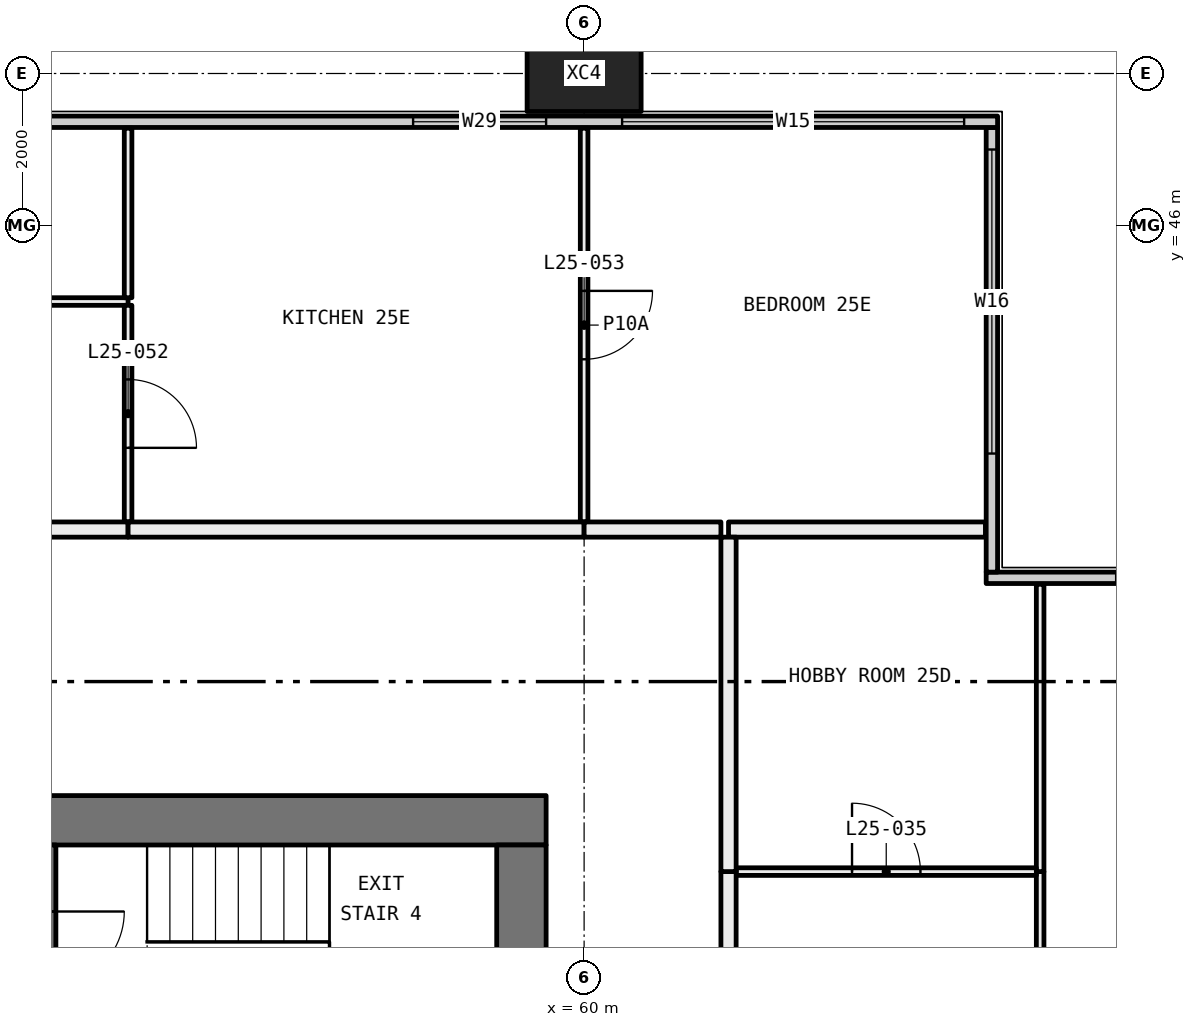
"""IFC4 building model, lengths in metres.
Left out: names, types, materials, properties, quantities, classifications, styles, units other than length and angle.
Written with IfcOpenShell. Run it as: python <this file> out.ifc"""

import sys

from ifc_helpers import new_model, si_unit, direction, frame, frame_2d, origin, origin_2d, place, context, subcontext, project, spatial, rectangle, hollow_rectangle, extrude, element, fill, save


model = new_model("IFC4")
c1 = context("Model", 3, precision=1e-05, world=origin(), true_north=direction((0.0, 1.0)))
c2 = subcontext(c1, "Body", "Model", "MODEL_VIEW")
j1 = project(units=[si_unit("LENGTHUNIT", "METRE"), si_unit("PLANEANGLEUNIT", "RADIAN")], contexts=[c1])
p1 = place(None, origin())
s1 = spatial("IfcSite", under=j1, at=p1, CompositionType="ELEMENT")
p2 = place(p1, origin())
s2 = spatial("IfcBuilding", under=s1, at=p2, CompositionType="ELEMENT")
p3 = place(p2, frame((0.0, 0.0, 100.05)))
s3 = spatial("IfcBuildingStorey", under=s2, at=p3, CompositionType="ELEMENT", Elevation=100.05)
p4 = place(p3, frame((60.0, 48.0, -0.4), z_axis=(0.0, 0.0, 1.0), x_axis=(1.0, 0.0, 0.0)))
e1 = element("IfcColumn", 1, at=p4, inside=s3, PredefinedType="COLUMN", context=c2, shape_type="SweptSolid", body=[
    extrude(hollow_rectangle(XDim=1.5, YDim=1.0, WallThickness=0.06, at=origin_2d()), origin(), (0.0, 0.0, 1.0), 3.45),
])
p5 = place(p3, frame((65.29, 41.365, 0.0), z_axis=(0.0, 0.0, 1.0), x_axis=(1.0, 0.0, 0.0)))
e2 = element("IfcWall", 2, at=p5, inside=s3, PredefinedType="ELEMENTEDWALL", context=c2, shape_type="SweptSolid", body=[
    extrude(rectangle(XDim=6.15, YDim=0.15, at=frame_2d((3.075, 0.0))), origin(), (0.0, 0.0, 1.0), 3.05),
])
p6 = place(p5, frame((1.71, 0.0, 0.45)))
e3 = element("IfcOpeningElement", 3, at=p6, cuts=e2, PredefinedType="OPENING", context=c2, shape_type="SweptSolid", body=[
    extrude(rectangle(XDim=4.0, YDim=2.55, at=frame_2d((2.0, 1.275))), frame((0.0, 0.085, 0.0), z_axis=(0.0, -1.0, 0.0), x_axis=(1.0, 0.0, 0.0)), (0.0, 0.0, 1.0), 0.17),
])
p7 = place(p3, frame((65.365, 41.44, 0.0), z_axis=(0.0, 0.0, 1.0), x_axis=(0.0, 1.0, 0.0)))
e4 = element("IfcWall", 4, at=p7, inside=s3, PredefinedType="ELEMENTEDWALL", context=c2, shape_type="SweptSolid", body=[
    extrude(rectangle(XDim=5.85, YDim=0.15, at=frame_2d((2.925, 0.0))), origin(), (0.0, 0.0, 1.0), 3.05),
])
p8 = place(p7, frame((1.56, 0.0, 0.45)))
e5 = element("IfcOpeningElement", 5, at=p8, cuts=e4, PredefinedType="OPENING", context=c2, shape_type="SweptSolid", body=[
    extrude(rectangle(XDim=4.0, YDim=2.55, at=frame_2d((2.0, 1.275))), frame((0.0, 0.085, 0.0), z_axis=(0.0, -1.0, 0.0), x_axis=(1.0, 0.0, 0.0)), (0.0, 0.0, 1.0), 0.17),
])
p9 = place(p3, frame((6.56, 47.365, 0.0), z_axis=(0.0, 0.0, 1.0), x_axis=(1.0, 0.0, 0.0)))
e6 = element("IfcWall", 6, at=p9, inside=s3, PredefinedType="ELEMENTEDWALL", context=c2, shape_type="SweptSolid", body=[
    extrude(rectangle(XDim=58.88, YDim=0.15, at=frame_2d((29.44, 0.0))), origin(), (0.0, 0.0, 1.0), 3.05),
])
p10 = place(p9, frame((0.44, 0.0, 0.45)))
e7 = element("IfcOpeningElement", 7, at=p10, cuts=e6, PredefinedType="OPENING", context=c2, shape_type="SweptSolid", body=[
    extrude(rectangle(XDim=4.5, YDim=2.55, at=frame_2d((2.25, 1.275))), frame((0.0, 0.085, 0.0), z_axis=(0.0, -1.0, 0.0), x_axis=(1.0, 0.0, 0.0)), (0.0, 0.0, 1.0), 0.17),
])
p11 = place(p9, frame((5.94, 0.0, 0.45)))
e8 = element("IfcOpeningElement", 8, at=p11, cuts=e6, PredefinedType="OPENING", context=c2, shape_type="SweptSolid", body=[
    extrude(rectangle(XDim=1.75, YDim=2.55, at=frame_2d((0.875, 1.275))), frame((0.0, 0.085, 0.0), z_axis=(0.0, -1.0, 0.0), x_axis=(1.0, 0.0, 0.0)), (0.0, 0.0, 1.0), 0.17),
])
p12 = place(p9, frame((15.19, 0.0, 0.45)))
e9 = element("IfcOpeningElement", 9, at=p12, cuts=e6, PredefinedType="OPENING", context=c2, shape_type="SweptSolid", body=[
    extrude(rectangle(XDim=1.75, YDim=2.55, at=frame_2d((0.875, 1.275))), frame((0.0, 0.085, 0.0), z_axis=(0.0, -1.0, 0.0), x_axis=(1.0, 0.0, 0.0)), (0.0, 0.0, 1.0), 0.17),
])
p13 = place(p9, frame((17.94, 0.0, 0.45)))
e10 = element("IfcOpeningElement", 10, at=p13, cuts=e6, PredefinedType="OPENING", context=c2, shape_type="SweptSolid", body=[
    extrude(rectangle(XDim=1.75, YDim=2.55, at=frame_2d((0.875, 1.275))), frame((0.0, 0.085, 0.0), z_axis=(0.0, -1.0, 0.0), x_axis=(1.0, 0.0, 0.0)), (0.0, 0.0, 1.0), 0.17),
])
p14 = place(p9, frame((27.19, 0.0, 0.45)))
e11 = element("IfcOpeningElement", 11, at=p14, cuts=e6, PredefinedType="OPENING", context=c2, shape_type="SweptSolid", body=[
    extrude(rectangle(XDim=1.75, YDim=2.55, at=frame_2d((0.875, 1.275))), frame((0.0, 0.085, 0.0), z_axis=(0.0, -1.0, 0.0), x_axis=(1.0, 0.0, 0.0)), (0.0, 0.0, 1.0), 0.17),
])
p15 = place(p9, frame((29.94, 0.0, 0.45)))
e12 = element("IfcOpeningElement", 12, at=p15, cuts=e6, PredefinedType="OPENING", context=c2, shape_type="SweptSolid", body=[
    extrude(rectangle(XDim=1.75, YDim=2.55, at=frame_2d((0.875, 1.275))), frame((0.0, 0.085, 0.0), z_axis=(0.0, -1.0, 0.0), x_axis=(1.0, 0.0, 0.0)), (0.0, 0.0, 1.0), 0.17),
])
p16 = place(p9, frame((39.19, 0.0, 0.45)))
e13 = element("IfcOpeningElement", 13, at=p16, cuts=e6, PredefinedType="OPENING", context=c2, shape_type="SweptSolid", body=[
    extrude(rectangle(XDim=1.75, YDim=2.55, at=frame_2d((0.875, 1.275))), frame((0.0, 0.085, 0.0), z_axis=(0.0, -1.0, 0.0), x_axis=(1.0, 0.0, 0.0)), (0.0, 0.0, 1.0), 0.17),
])
p17 = place(p9, frame((41.94, 0.0, 0.45)))
e14 = element("IfcOpeningElement", 14, at=p17, cuts=e6, PredefinedType="OPENING", context=c2, shape_type="SweptSolid", body=[
    extrude(rectangle(XDim=1.75, YDim=2.55, at=frame_2d((0.875, 1.275))), frame((0.0, 0.085, 0.0), z_axis=(0.0, -1.0, 0.0), x_axis=(1.0, 0.0, 0.0)), (0.0, 0.0, 1.0), 0.17),
])
p18 = place(p9, frame((51.19, 0.0, 0.45)))
e15 = element("IfcOpeningElement", 15, at=p18, cuts=e6, PredefinedType="OPENING", context=c2, shape_type="SweptSolid", body=[
    extrude(rectangle(XDim=1.75, YDim=2.55, at=frame_2d((0.875, 1.275))), frame((0.0, 0.085, 0.0), z_axis=(0.0, -1.0, 0.0), x_axis=(1.0, 0.0, 0.0)), (0.0, 0.0, 1.0), 0.17),
])
p19 = place(p9, frame((53.94, 0.0, 0.45)))
e16 = element("IfcOpeningElement", 16, at=p19, cuts=e6, PredefinedType="OPENING", context=c2, shape_type="SweptSolid", body=[
    extrude(rectangle(XDim=4.5, YDim=2.55, at=frame_2d((2.25, 1.275))), frame((0.0, 0.085, 0.0), z_axis=(0.0, -1.0, 0.0), x_axis=(1.0, 0.0, 0.0)), (0.0, 0.0, 1.0), 0.17),
])
p20 = place(p3, frame((66.0, 37.5, 0.0), z_axis=(0.0, 0.0, 1.0), x_axis=(0.0, -1.0, 0.0)))
e17 = element("IfcWall", 17, at=p20, inside=s3, PredefinedType="PARTITIONING", context=c2, shape_type="SweptSolid", body=[
    extrude(rectangle(XDim=1.45, YDim=0.1, at=frame_2d((0.725, 0.0))), origin(), (0.0, 0.0, 1.0), 2.45),
])
p21 = place(p3, frame((66.0, 41.28, 0.0), z_axis=(0.0, 0.0, 1.0), x_axis=(0.0, -1.0, 0.0)))
e18 = element("IfcWall", 18, at=p21, inside=s3, PredefinedType="PARTITIONING", context=c2, shape_type="SweptSolid", body=[
    extrude(rectangle(XDim=3.78, YDim=0.1, at=frame_2d((1.89, 0.0))), origin(), (0.0, 0.0, 1.0), 3.05),
])
p22 = place(p3, frame((65.95, 37.5, 0.0), z_axis=(0.0, 0.0, 1.0), x_axis=(-1.0, 0.0, 0.0)))
e19 = element("IfcWall", 19, at=p22, inside=s3, PredefinedType="PARTITIONING", context=c2, shape_type="SweptSolid", body=[
    extrude(rectangle(XDim=3.95, YDim=0.1, at=frame_2d((1.975, 0.0))), origin(), (0.0, 0.0, 1.0), 3.05),
])
p23 = place(p22, frame((1.525, 0.0, 0.0)))
e20 = element("IfcOpeningElement", 20, at=p23, cuts=e19, PredefinedType="OPENING", context=c2, shape_type="SweptSolid", body=[
    extrude(rectangle(XDim=0.9, YDim=2.1, at=frame_2d((0.45, 1.05))), frame((0.0, 0.06, 0.0), z_axis=(0.0, -1.0, 0.0), x_axis=(1.0, 0.0, 0.0)), (0.0, 0.0, 1.0), 0.12),
])
p24 = place(p3, frame((61.9, 37.5, 0.0), z_axis=(0.0, 0.0, 1.0), x_axis=(0.0, -1.0, 0.0)))
e21 = element("IfcWall", 21, at=p24, inside=s3, PredefinedType="PARTITIONING", context=c2, shape_type="SweptSolid", body=[
    extrude(rectangle(XDim=1.6, YDim=0.2, at=frame_2d((0.8, 0.0))), origin(), (0.0, 0.0, 1.0), 2.45),
])
p25 = place(p3, frame((65.28, 42.0, 0.0), z_axis=(0.0, 0.0, 1.0), x_axis=(-1.0, 0.0, 0.0)))
e22 = element("IfcWall", 22, at=p25, inside=s3, PredefinedType="PARTITIONING", context=c2, shape_type="SweptSolid", body=[
    extrude(rectangle(XDim=3.38, YDim=0.2, at=frame_2d((1.69, 0.0))), origin(), (0.0, 0.0, 1.0), 3.05),
])
p26 = place(p3, frame((61.9, 41.9, 0.0), z_axis=(0.0, 0.0, 1.0), x_axis=(0.0, -1.0, 0.0)))
e23 = element("IfcWall", 23, at=p26, inside=s3, PredefinedType="PARTITIONING", context=c2, shape_type="SweptSolid", body=[
    extrude(rectangle(XDim=4.4, YDim=0.2, at=frame_2d((2.2, 0.0))), origin(), (0.0, 0.0, 1.0), 3.05),
])
p27 = place(p3, frame((54.0, 45.0, 0.0), z_axis=(0.0, 0.0, 1.0), x_axis=(-1.0, 0.0, 0.0)))
e24 = element("IfcWall", 24, at=p27, inside=s3, PredefinedType="PARTITIONING", context=c2, shape_type="SweptSolid", body=[
    extrude(rectangle(XDim=17.925, YDim=0.1, at=frame_2d((8.962, 0.0))), origin(), (0.0, 0.0, 1.0), 2.45),
])
p28 = place(p27, frame((8.512, 0.0, 0.0)))
e25 = element("IfcOpeningElement", 25, at=p28, cuts=e24, PredefinedType="OPENING", context=c2, shape_type="SweptSolid", body=[
    extrude(rectangle(XDim=0.9, YDim=2.1, at=frame_2d((0.45, 1.05))), frame((0.0, 0.06, 0.0), z_axis=(0.0, -1.0, 0.0), x_axis=(1.0, 0.0, 0.0)), (0.0, 0.0, 1.0), 0.12),
])
p29 = place(p3, frame((54.0, 42.1, 0.0), z_axis=(0.0, 0.0, 1.0), x_axis=(0.0, 1.0, 0.0)))
e26 = element("IfcWall", 26, at=p29, inside=s3, PredefinedType="PARTITIONING", context=c2, shape_type="SweptSolid", body=[
    extrude(rectangle(XDim=2.85, YDim=0.1, at=frame_2d((1.425, 0.0))), origin(), (0.0, 0.0, 1.0), 3.05),
])
p30 = place(p29, frame((0.975, 0.0, 0.0)))
e27 = element("IfcOpeningElement", 27, at=p30, cuts=e26, PredefinedType="OPENING", context=c2, shape_type="SweptSolid", body=[
    extrude(rectangle(XDim=0.9, YDim=2.1, at=frame_2d((0.45, 1.05))), frame((0.0, 0.06, 0.0), z_axis=(0.0, -1.0, 0.0), x_axis=(1.0, 0.0, 0.0)), (0.0, 0.0, 1.0), 0.12),
])
p31 = place(p3, frame((46.1, 42.0, 0.0), z_axis=(0.0, 0.0, 1.0), x_axis=(1.0, 0.0, 0.0)))
e28 = element("IfcWall", 28, at=p31, inside=s3, PredefinedType="PARTITIONING", context=c2, shape_type="SweptSolid", body=[
    extrude(rectangle(XDim=7.9, YDim=0.2, at=frame_2d((3.95, 0.0))), origin(), (0.0, 0.0, 1.0), 3.05),
])
p32 = place(p3, frame((54.0, 45.05, 0.0), z_axis=(0.0, 0.0, 1.0), x_axis=(0.0, 1.0, 0.0)))
e29 = element("IfcWall", 29, at=p32, inside=s3, PredefinedType="PARTITIONING", context=c2, shape_type="SweptSolid", body=[
    extrude(rectangle(XDim=2.23, YDim=0.1, at=frame_2d((1.115, 0.0))), origin(), (0.0, 0.0, 1.0), 3.05),
])
p33 = place(p3, frame((60.0, 42.1, 0.0), z_axis=(0.0, 0.0, 1.0), x_axis=(0.0, 1.0, 0.0)))
e30 = element("IfcWall", 30, at=p33, inside=s3, PredefinedType="PARTITIONING", context=c2, shape_type="SweptSolid", body=[
    extrude(rectangle(XDim=5.18, YDim=0.1, at=frame_2d((2.59, 0.0))), origin(), (0.0, 0.0, 1.0), 3.05),
])
p34 = place(p33, frame((2.14, 0.0, 0.0)))
e31 = element("IfcOpeningElement", 31, at=p34, cuts=e30, PredefinedType="OPENING", context=c2, shape_type="SweptSolid", body=[
    extrude(rectangle(XDim=0.9, YDim=2.1, at=frame_2d((0.45, 1.05))), frame((0.0, 0.06, 0.0), z_axis=(0.0, -1.0, 0.0), x_axis=(1.0, 0.0, 0.0)), (0.0, 0.0, 1.0), 0.12),
])
p35 = place(p3, frame((54.0, 42.0, 0.0), z_axis=(0.0, 0.0, 1.0), x_axis=(1.0, 0.0, 0.0)))
e32 = element("IfcWall", 32, at=p35, inside=s3, PredefinedType="PARTITIONING", context=c2, shape_type="SweptSolid", body=[
    extrude(rectangle(XDim=6.0, YDim=0.2, at=frame_2d((3.0, 0.0))), origin(), (0.0, 0.0, 1.0), 3.05),
])
p36 = place(p3, frame((60.0, 42.0, 0.0), z_axis=(0.0, 0.0, 1.0), x_axis=(1.0, 0.0, 0.0)))
e33 = element("IfcWall", 33, at=p36, inside=s3, PredefinedType="PARTITIONING", context=c2, shape_type="SweptSolid", body=[
    extrude(rectangle(XDim=1.8, YDim=0.2, at=frame_2d((0.9, 0.0))), origin(), (0.0, 0.0, 1.0), 3.05),
])
p37 = place(p3, frame((59.5, 38.175, 0.0), z_axis=(0.0, 0.0, 1.0), x_axis=(-1.0, 0.0, 0.0)))
e34 = element("IfcWall", 34, at=p37, inside=s3, PredefinedType="SHEAR", context=c2, shape_type="SweptSolid", body=[
    extrude(rectangle(XDim=11.0, YDim=0.65, at=frame_2d((5.5, 0.0))), origin(), (0.0, 0.0, 1.0), 3.05),
])
p38 = place(p37, frame((8.475, 0.0, 0.0)))
e35 = element("IfcOpeningElement", 35, at=p38, cuts=e34, PredefinedType="OPENING", context=c2, shape_type="SweptSolid", body=[
    extrude(rectangle(XDim=1.6, YDim=2.1, at=frame_2d((0.8, 1.05))), frame((0.0, 0.335, 0.0), z_axis=(0.0, -1.0, 0.0), x_axis=(1.0, 0.0, 0.0)), (0.0, 0.0, 1.0), 0.67),
])
p39 = place(p3, frame((59.175, 22.15, 0.0), z_axis=(0.0, 0.0, 1.0), x_axis=(0.0, 1.0, 0.0)))
e36 = element("IfcWall", 36, at=p39, inside=s3, PredefinedType="SHEAR", context=c2, shape_type="SweptSolid", body=[
    extrude(rectangle(XDim=15.7, YDim=0.65, at=frame_2d((7.85, 0.0))), origin(), (0.0, 0.0, 1.0), 3.05),
])
p40 = place(p39, frame((8.3, 0.0, 0.0)))
e37 = element("IfcOpeningElement", 37, at=p40, cuts=e36, PredefinedType="OPENING", context=c2, shape_type="SweptSolid", body=[
    extrude(rectangle(XDim=1.6, YDim=2.1, at=frame_2d((0.8, 1.05))), frame((0.0, 0.335, 0.0), z_axis=(0.0, -1.0, 0.0), x_axis=(1.0, 0.0, 0.0)), (0.0, 0.0, 1.0), 0.67),
])
p41 = place(p39, frame((2.125, 0.0, 0.0)))
e38 = element("IfcOpeningElement", 38, at=p41, cuts=e36, PredefinedType="OPENING", context=c2, shape_type="SweptSolid", body=[
    extrude(rectangle(XDim=1.0, YDim=2.1, at=frame_2d((0.5, 1.05))), frame((0.0, 0.335, 0.0), z_axis=(0.0, -1.0, 0.0), x_axis=(1.0, 0.0, 0.0)), (0.0, 0.0, 1.0), 0.67),
])
p42 = place(p3, frame((52.95, 35.1, 0.0), z_axis=(0.0, 0.0, 1.0), x_axis=(0.0, 1.0, 0.0)))
e39 = element("IfcWall", 39, at=p42, inside=s3, PredefinedType="SOLIDWALL", context=c2, shape_type="SweptSolid", body=[
    extrude(rectangle(XDim=2.75, YDim=0.2, at=frame_2d((1.375, 0.0))), origin(), (0.0, 0.0, 1.0), 3.05),
])
p43 = place(p42, frame((0.875, 0.0, 0.0)))
e40 = element("IfcOpeningElement", 40, at=p43, cuts=e39, PredefinedType="OPENING", context=c2, shape_type="SweptSolid", body=[
    extrude(rectangle(XDim=1.0, YDim=2.1, at=frame_2d((0.5, 1.05))), frame((0.0, 0.11, 0.0), z_axis=(0.0, -1.0, 0.0), x_axis=(1.0, 0.0, 0.0)), (0.0, 0.0, 1.0), 0.22),
])
p44 = place(p8, origin())
e41 = element("IfcWindow", 41, at=p44, inside=s3, PartitioningType="SINGLE_PANEL", PredefinedType="WINDOW", context=c2, shape_type="SweptSolid", body=[
    extrude(rectangle(XDim=4.0, YDim=2.55, at=frame_2d((2.0, 1.275))), frame((0.0, 0.03, 0.0), z_axis=(0.0, -1.0, 0.0), x_axis=(1.0, 0.0, 0.0)), (0.0, 0.0, 1.0), 0.06),
])
fill(e5, e41)
p45 = place(p18, origin())
e42 = element("IfcWindow", 42, at=p45, inside=s3, PartitioningType="SINGLE_PANEL", PredefinedType="WINDOW", context=c2, shape_type="SweptSolid", body=[
    extrude(rectangle(XDim=1.75, YDim=2.55, at=frame_2d((0.875, 1.275))), frame((0.0, 0.03, 0.0), z_axis=(0.0, -1.0, 0.0), x_axis=(1.0, 0.0, 0.0)), (0.0, 0.0, 1.0), 0.06),
])
fill(e15, e42)
p46 = place(p19, origin())
e43 = element("IfcWindow", 43, at=p46, inside=s3, PartitioningType="SINGLE_PANEL", PredefinedType="WINDOW", context=c2, shape_type="SweptSolid", body=[
    extrude(rectangle(XDim=4.5, YDim=2.55, at=frame_2d((2.25, 1.275))), frame((0.0, 0.03, 0.0), z_axis=(0.0, -1.0, 0.0), x_axis=(1.0, 0.0, 0.0)), (0.0, 0.0, 1.0), 0.06),
])
fill(e16, e43)
p47 = place(p23, frame((0.9, 0.0, 0.0), x_axis=(-1.0, 0.0, 0.0)))
e44 = element("IfcDoor", 44, at=p47, inside=s3, OperationType="SINGLE_SWING_RIGHT", PredefinedType="DOOR", context=c2, shape_type="SweptSolid", body=[
    extrude(rectangle(XDim=0.9, YDim=2.1, at=frame_2d((0.45, 1.05))), frame((0.0, 0.025, 0.0), z_axis=(0.0, -1.0, 0.0), x_axis=(1.0, 0.0, 0.0)), (0.0, 0.0, 1.0), 0.05),
])
fill(e20, e44)
p48 = place(p30, frame((0.9, 0.0, 0.0), x_axis=(-1.0, 0.0, 0.0)))
e45 = element("IfcDoor", 45, at=p48, inside=s3, OperationType="SINGLE_SWING_LEFT", PredefinedType="DOOR", context=c2, shape_type="SweptSolid", body=[
    extrude(rectangle(XDim=0.9, YDim=2.1, at=frame_2d((0.45, 1.05))), frame((0.0, 0.025, 0.0), z_axis=(0.0, -1.0, 0.0), x_axis=(1.0, 0.0, 0.0)), (0.0, 0.0, 1.0), 0.05),
])
fill(e27, e45)
p49 = place(p34, frame((0.9, 0.0, 0.0), x_axis=(-1.0, 0.0, 0.0)))
e46 = element("IfcDoor", 46, at=p49, inside=s3, OperationType="SINGLE_SWING_RIGHT", PredefinedType="DOOR", context=c2, shape_type="SweptSolid", body=[
    extrude(rectangle(XDim=0.9, YDim=2.1, at=frame_2d((0.45, 1.05))), frame((0.0, 0.025, 0.0), z_axis=(0.0, -1.0, 0.0), x_axis=(1.0, 0.0, 0.0)), (0.0, 0.0, 1.0), 0.05),
])
fill(e31, e46)
save(model, sys.argv[1])
